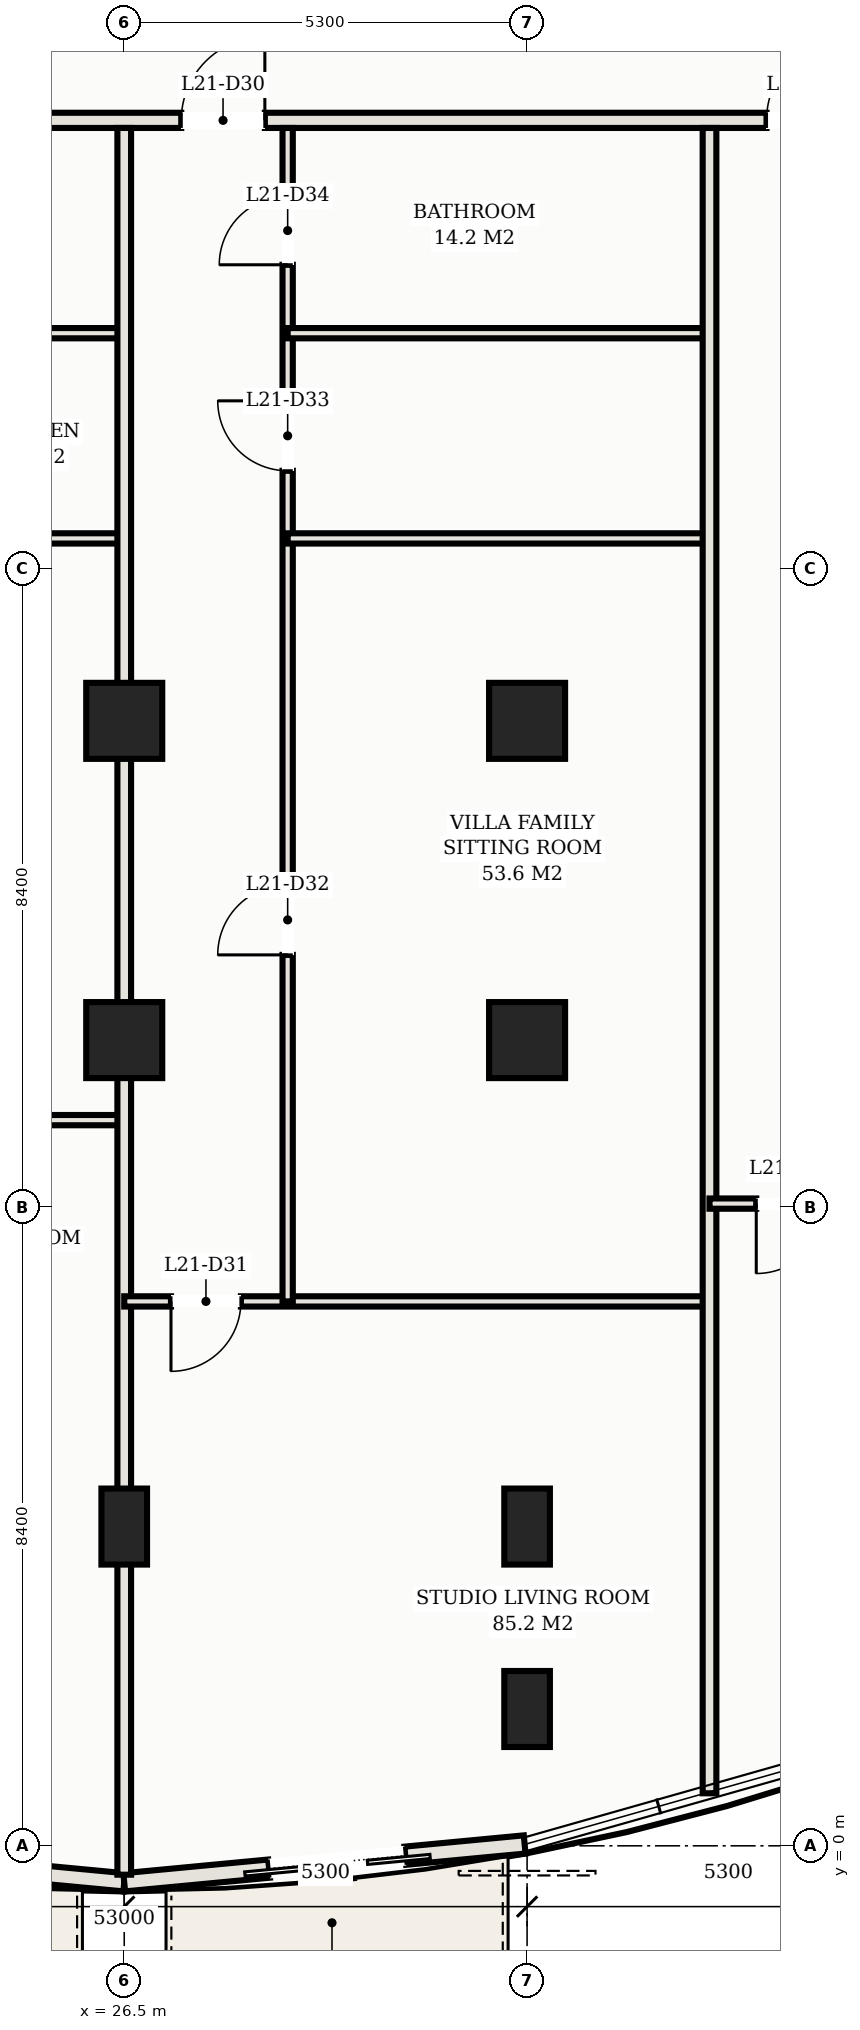
"""IFC4 building model, lengths in metres.
Left out: names, types, materials, properties, quantities, classifications, styles, units other than length and angle.
Written with IfcOpenShell. Run it as: python <this file> out.ifc"""

import sys

from ifc_helpers import new_model, si_unit, direction, frame, frame_2d, origin, origin_2d, place, context, subcontext, project, spatial, rectangle, hollow_rectangle, extrude, element, fill, save


model = new_model("IFC4")
c1 = context("Model", 3, precision=1e-05, world=origin(), true_north=direction((0.0, 1.0)))
c2 = subcontext(c1, "Body", "Model", "MODEL_VIEW")
j1 = project(units=[si_unit("LENGTHUNIT", "METRE"), si_unit("PLANEANGLEUNIT", "RADIAN")], contexts=[c1])
p1 = place(None, origin())
s1 = spatial("IfcSite", under=j1, at=p1, CompositionType="ELEMENT")
p2 = place(p1, origin())
s2 = spatial("IfcBuilding", under=s1, at=p2, CompositionType="ELEMENT")
p3 = place(p2, frame((0.0, 0.0, 81.7)))
s3 = spatial("IfcBuildingStorey", under=s2, at=p3, CompositionType="ELEMENT", Elevation=81.7)
for number, where, z_axis, x_axis in (
    (1, (26.5, 14.8, 0.0), (0.0, 0.0, 1.0), (1.0, 0.0, 0.0)),
    (2, (26.5, 10.6, 0.0), (0.0, 0.0, 1.0), (1.0, 0.0, 0.0)),
    (3, (31.8, 14.8, 0.0), (0.0, 0.0, 1.0), (1.0, 0.0, 0.0)),
    (4, (31.8, 10.6, 0.0), (0.0, 0.0, 1.0), (1.0, 0.0, 0.0)),
):
    element("IfcColumn", number, at=place(p3, frame(where, z_axis=z_axis, x_axis=x_axis)), inside=s3, PredefinedType="COLUMN", context=c2, shape_type="SweptSolid", body=[
        extrude(hollow_rectangle(XDim=1.0, YDim=1.0, WallThickness=0.036, at=origin_2d()), origin(), (0.0, 0.0, 1.0), 3.3),
    ])
for number, where, z_axis, x_axis in (
    (5, (31.8, 1.8, 0.0), (0.0, 0.0, 1.0), (1.0, 0.0, 0.0)),
    (6, (26.5, 4.2, 0.0), (0.0, 0.0, 1.0), (1.0, 0.0, 0.0)),
    (7, (31.8, 4.2, 0.0), (0.0, 0.0, 1.0), (1.0, 0.0, 0.0)),
):
    element("IfcColumn", number, at=place(p3, frame(where, z_axis=z_axis, x_axis=x_axis)), inside=s3, PredefinedType="COLUMN", context=c2, shape_type="SweptSolid", body=[
        extrude(hollow_rectangle(XDim=0.6, YDim=1.0, WallThickness=0.032, at=origin_2d()), origin(), (0.0, 0.0, 1.0), 3.3),
    ])
p4 = place(p3, frame((21.232, 0.018, 0.0), z_axis=(0.0, 0.0, 1.0), x_axis=(0.995560760834, -0.094121046997, 0.0)))
e8 = element("IfcWall", 8, at=p4, inside=s3, PredefinedType="SOLIDWALL", context=c2, shape_type="SweptSolid", body=[
    extrude(rectangle(XDim=5.292, YDim=0.24, at=frame_2d((2.646, 0.0))), origin(), (0.0, 0.0, 1.0), 3.09),
])
p5 = place(p4, frame((1.577, 0.0, 0.0)))
e9 = element("IfcOpeningElement", 9, at=p5, cuts=e8, PredefinedType="OPENING", context=c2, shape_type="SweptSolid", body=[
    extrude(rectangle(XDim=1.8, YDim=2.2, at=frame_2d((0.9, 1.1))), frame((0.0, 0.13, 0.0), z_axis=(0.0, -1.0, 0.0), x_axis=(1.0, 0.0, 0.0)), (0.0, 0.0, 1.0), 0.26),
])
p6 = place(p3, frame((26.5, -0.48, 0.0), z_axis=(0.0, 0.0, 1.0), x_axis=(0.995560760834, 0.094121046997, 0.0)))
e10 = element("IfcWall", 10, at=p6, inside=s3, PredefinedType="SOLIDWALL", context=c2, shape_type="SweptSolid", body=[
    extrude(rectangle(XDim=5.292, YDim=0.24, at=frame_2d((2.646, 0.0))), origin(), (0.0, 0.0, 1.0), 3.09),
])
p7 = place(p6, frame((1.914, 0.0, 0.0)))
e11 = element("IfcOpeningElement", 11, at=p7, cuts=e10, PredefinedType="OPENING", context=c2, shape_type="SweptSolid", body=[
    extrude(rectangle(XDim=1.8, YDim=2.2, at=frame_2d((0.9, 1.1))), frame((0.0, 0.13, 0.0), z_axis=(0.0, -1.0, 0.0), x_axis=(1.0, 0.0, 0.0)), (0.0, 0.0, 1.0), 0.26),
])
p8 = place(p3, frame((1.62, 22.7, 0.0), z_axis=(0.0, 0.0, 1.0), x_axis=(1.0, 0.0, 0.0)))
e12 = element("IfcWall", 12, at=p8, inside=s3, PredefinedType="PARTITIONING", context=c2, shape_type="SweptSolid", body=[
    extrude(rectangle(XDim=49.76, YDim=0.2, at=frame_2d((24.88, 0.0))), origin(), (0.0, 0.0, 1.0), 2.38),
])
p9 = place(p8, frame((9.73, 0.0, 0.0)))
e13 = element("IfcOpeningElement", 13, at=p9, cuts=e12, PredefinedType="OPENING", context=c2, shape_type="SweptSolid", body=[
    extrude(rectangle(XDim=1.1, YDim=2.25, at=frame_2d((0.55, 1.125))), frame((0.0, 0.11, 0.0), z_axis=(0.0, -1.0, 0.0), x_axis=(1.0, 0.0, 0.0)), (0.0, 0.0, 1.0), 0.22),
])
p10 = place(p8, frame((15.03, 0.0, 0.0)))
e14 = element("IfcOpeningElement", 14, at=p10, cuts=e12, PredefinedType="OPENING", context=c2, shape_type="SweptSolid", body=[
    extrude(rectangle(XDim=1.1, YDim=2.25, at=frame_2d((0.55, 1.125))), frame((0.0, 0.11, 0.0), z_axis=(0.0, -1.0, 0.0), x_axis=(1.0, 0.0, 0.0)), (0.0, 0.0, 1.0), 0.22),
])
p11 = place(p8, frame((20.33, 0.0, 0.0)))
e15 = element("IfcOpeningElement", 15, at=p11, cuts=e12, PredefinedType="OPENING", context=c2, shape_type="SweptSolid", body=[
    extrude(rectangle(XDim=1.1, YDim=2.25, at=frame_2d((0.55, 1.125))), frame((0.0, 0.11, 0.0), z_axis=(0.0, -1.0, 0.0), x_axis=(1.0, 0.0, 0.0)), (0.0, 0.0, 1.0), 0.22),
])
p12 = place(p8, frame((25.63, 0.0, 0.0)))
e16 = element("IfcOpeningElement", 16, at=p12, cuts=e12, PredefinedType="OPENING", context=c2, shape_type="SweptSolid", body=[
    extrude(rectangle(XDim=1.1, YDim=2.25, at=frame_2d((0.55, 1.125))), frame((0.0, 0.11, 0.0), z_axis=(0.0, -1.0, 0.0), x_axis=(1.0, 0.0, 0.0)), (0.0, 0.0, 1.0), 0.22),
])
p13 = place(p8, frame((33.33, 0.0, 0.0)))
e17 = element("IfcOpeningElement", 17, at=p13, cuts=e12, PredefinedType="OPENING", context=c2, shape_type="SweptSolid", body=[
    extrude(rectangle(XDim=1.1, YDim=2.25, at=frame_2d((0.55, 1.125))), frame((0.0, 0.11, 0.0), z_axis=(0.0, -1.0, 0.0), x_axis=(1.0, 0.0, 0.0)), (0.0, 0.0, 1.0), 0.22),
])
p14 = place(p8, frame((3.985, 0.0, 0.0)))
e18 = element("IfcOpeningElement", 18, at=p14, cuts=e12, PredefinedType="OPENING", context=c2, shape_type="SweptSolid", body=[
    extrude(rectangle(XDim=0.92, YDim=2.15, at=frame_2d((0.46, 1.075))), frame((0.0, 0.11, 0.0), z_axis=(0.0, -1.0, 0.0), x_axis=(1.0, 0.0, 0.0)), (0.0, 0.0, 1.0), 0.22),
])
p15 = place(p8, frame((44.855, 0.0, 0.0)))
e19 = element("IfcOpeningElement", 19, at=p15, cuts=e12, PredefinedType="OPENING", context=c2, shape_type="SweptSolid", body=[
    extrude(rectangle(XDim=0.92, YDim=2.15, at=frame_2d((0.46, 1.075))), frame((0.0, 0.11, 0.0), z_axis=(0.0, -1.0, 0.0), x_axis=(1.0, 0.0, 0.0)), (0.0, 0.0, 1.0), 0.22),
])
p16 = place(p3, frame((21.2, 9.547, 0.0), z_axis=(0.0, 0.0, 1.0), x_axis=(1.0, 0.0, 0.0)))
e20 = element("IfcWall", 20, at=p16, inside=s3, PredefinedType="PARTITIONING", context=c2, shape_type="SweptSolid", body=[
    extrude(rectangle(XDim=5.3, YDim=0.135, at=frame_2d((2.65, 0.0))), origin(), (0.0, 0.0, 1.0), 2.38),
])
p17 = place(p16, frame((0.815, 0.0, 0.0)))
e21 = element("IfcOpeningElement", 21, at=p17, cuts=e20, PredefinedType="OPENING", context=c2, shape_type="SweptSolid", body=[
    extrude(rectangle(XDim=0.92, YDim=2.15, at=frame_2d((0.46, 1.075))), frame((0.0, 0.078, 0.0), z_axis=(0.0, -1.0, 0.0), x_axis=(1.0, 0.0, 0.0)), (0.0, 0.0, 1.0), 0.155),
])
for number, where, z_axis, x_axis in (
    (22, (23.35, 17.2, 0.0), (0.0, 0.0, 1.0), (1.0, 0.0, 0.0)),
    (23, (23.35, 19.9, 0.0), (0.0, 0.0, 1.0), (1.0, 0.0, 0.0)),
):
    element("IfcWall", number, at=place(p3, frame(where, z_axis=z_axis, x_axis=x_axis)), inside=s3, PredefinedType="PARTITIONING", context=c2, shape_type="SweptSolid", body=[
        extrude(rectangle(XDim=3.15, YDim=0.135, at=frame_2d((1.575, 0.0))), origin(), (0.0, 0.0, 1.0), 2.38),
    ])
p18 = place(p3, frame((26.5, -0.38, 0.0), z_axis=(0.0, 0.0, 1.0), x_axis=(0.0, 1.0, 0.0)))
e24 = element("IfcWall", 24, at=p18, inside=s3, PredefinedType="PARTITIONING", context=c2, shape_type="SweptSolid", body=[
    extrude(rectangle(XDim=22.98, YDim=0.18, at=frame_2d((11.49, 0.0))), origin(), (0.0, 0.0, 1.0), 2.335),
])
p19 = place(p3, frame((26.5, 7.162, 0.0), z_axis=(0.0, 0.0, 1.0), x_axis=(1.0, 0.0, 0.0)))
e25 = element("IfcWall", 25, at=p19, inside=s3, PredefinedType="PARTITIONING", context=c2, shape_type="SweptSolid", body=[
    extrude(rectangle(XDim=7.7, YDim=0.135, at=frame_2d((3.85, 0.0))), origin(), (0.0, 0.0, 1.0), 2.38),
])
p20 = place(p19, frame((0.615, 0.0, 0.0)))
e26 = element("IfcOpeningElement", 26, at=p20, cuts=e25, PredefinedType="OPENING", context=c2, shape_type="SweptSolid", body=[
    extrude(rectangle(XDim=0.92, YDim=2.15, at=frame_2d((0.46, 1.075))), frame((0.0, 0.078, 0.0), z_axis=(0.0, -1.0, 0.0), x_axis=(1.0, 0.0, 0.0)), (0.0, 0.0, 1.0), 0.155),
])
p21 = place(p3, frame((28.65, 7.162, 0.0), z_axis=(0.0, 0.0, 1.0), x_axis=(0.0, 1.0, 0.0)))
e27 = element("IfcWall", 27, at=p21, inside=s3, PredefinedType="PARTITIONING", context=c2, shape_type="SweptSolid", body=[
    extrude(rectangle(XDim=15.438, YDim=0.135, at=frame_2d((7.719, 0.0))), origin(), (0.0, 0.0, 1.0), 2.38),
])
p22 = place(p21, frame((4.559, 0.0, 0.0)))
e28 = element("IfcOpeningElement", 28, at=p22, cuts=e27, PredefinedType="OPENING", context=c2, shape_type="SweptSolid", body=[
    extrude(rectangle(XDim=0.92, YDim=2.15, at=frame_2d((0.46, 1.075))), frame((0.0, 0.078, 0.0), z_axis=(0.0, -1.0, 0.0), x_axis=(1.0, 0.0, 0.0)), (0.0, 0.0, 1.0), 0.155),
])
p23 = place(p21, frame((10.928, 0.0, 0.0)))
e29 = element("IfcOpeningElement", 29, at=p23, cuts=e27, PredefinedType="OPENING", context=c2, shape_type="SweptSolid", body=[
    extrude(rectangle(XDim=0.92, YDim=2.15, at=frame_2d((0.46, 1.075))), frame((0.0, 0.078, 0.0), z_axis=(0.0, -1.0, 0.0), x_axis=(1.0, 0.0, 0.0)), (0.0, 0.0, 1.0), 0.155),
])
p24 = place(p21, frame((13.638, 0.0, 0.0)))
e30 = element("IfcOpeningElement", 30, at=p24, cuts=e27, PredefinedType="OPENING", context=c2, shape_type="SweptSolid", body=[
    extrude(rectangle(XDim=0.9, YDim=2.15, at=frame_2d((0.45, 1.075))), frame((0.0, 0.078, 0.0), z_axis=(0.0, -1.0, 0.0), x_axis=(1.0, 0.0, 0.0)), (0.0, 0.0, 1.0), 0.155),
])
for number, where, z_axis, x_axis in (
    (31, (28.65, 17.2, 0.0), (0.0, 0.0, 1.0), (1.0, 0.0, 0.0)),
    (32, (28.65, 19.9, 0.0), (0.0, 0.0, 1.0), (1.0, 0.0, 0.0)),
):
    element("IfcWall", number, at=place(p3, frame(where, z_axis=z_axis, x_axis=x_axis)), inside=s3, PredefinedType="PARTITIONING", context=c2, shape_type="SweptSolid", body=[
        extrude(rectangle(XDim=5.55, YDim=0.135, at=frame_2d((2.775, 0.0))), origin(), (0.0, 0.0, 1.0), 2.38),
    ])
p25 = place(p3, frame((34.2, 0.691, 0.0), z_axis=(0.0, 0.0, 1.0), x_axis=(0.0, 1.0, 0.0)))
e33 = element("IfcWall", 33, at=p25, inside=s3, PredefinedType="PARTITIONING", context=c2, shape_type="SweptSolid", body=[
    extrude(rectangle(XDim=21.909, YDim=0.18, at=frame_2d((10.955, 0.0))), origin(), (0.0, 0.0, 1.0), 2.38),
])
p26 = place(p3, frame((34.2, 8.449, 0.0), z_axis=(0.0, 0.0, 1.0), x_axis=(1.0, 0.0, 0.0)))
e34 = element("IfcWall", 34, at=p26, inside=s3, PredefinedType="PARTITIONING", context=c2, shape_type="SweptSolid", body=[
    extrude(rectangle(XDim=8.2, YDim=0.135, at=frame_2d((4.1, 0.0))), origin(), (0.0, 0.0, 1.0), 2.38),
])
p27 = place(p26, frame((0.615, 0.0, 0.0)))
e35 = element("IfcOpeningElement", 35, at=p27, cuts=e34, PredefinedType="OPENING", context=c2, shape_type="SweptSolid", body=[
    extrude(rectangle(XDim=0.92, YDim=2.15, at=frame_2d((0.46, 1.075))), frame((0.0, 0.078, 0.0), z_axis=(0.0, -1.0, 0.0), x_axis=(1.0, 0.0, 0.0)), (0.0, 0.0, 1.0), 0.155),
])
p28 = place(p7, frame((1.8, 0.0, 0.0), z_axis=(0.0, 0.0, 1.0), x_axis=(-1.0, 0.0, 0.0)))
e36 = element("IfcDoor", 36, at=p28, inside=s3, OperationType="DOUBLE_DOOR_SLIDING", PredefinedType="DOOR", context=c2, shape_type="SweptSolid", body=[
    extrude(rectangle(XDim=1.8, YDim=2.2, at=frame_2d((0.9, 1.1))), frame((0.0, 0.025, 0.0), z_axis=(0.0, -1.0, 0.0), x_axis=(1.0, 0.0, 0.0)), (0.0, 0.0, 1.0), 0.05),
])
fill(e11, e36)
p29 = place(p12, origin())
e37 = element("IfcDoor", 37, at=p29, inside=s3, OperationType="SINGLE_SWING_RIGHT", PredefinedType="DOOR", context=c2, shape_type="SweptSolid", body=[
    extrude(rectangle(XDim=1.1, YDim=2.25, at=frame_2d((0.55, 1.125))), frame((0.0, 0.025, 0.0), z_axis=(0.0, -1.0, 0.0), x_axis=(1.0, 0.0, 0.0)), (0.0, 0.0, 1.0), 0.05),
])
fill(e16, e37)
p30 = place(p20, frame((0.92, 0.0, 0.0), z_axis=(0.0, 0.0, 1.0), x_axis=(-1.0, 0.0, 0.0)))
e38 = element("IfcDoor", 38, at=p30, inside=s3, OperationType="SINGLE_SWING_RIGHT", PredefinedType="DOOR", context=c2, shape_type="SweptSolid", body=[
    extrude(rectangle(XDim=0.92, YDim=2.15, at=frame_2d((0.46, 1.075))), frame((0.0, 0.025, 0.0), z_axis=(0.0, -1.0, 0.0), x_axis=(1.0, 0.0, 0.0)), (0.0, 0.0, 1.0), 0.05),
])
fill(e26, e38)
p31 = place(p22, origin())
e39 = element("IfcDoor", 39, at=p31, inside=s3, OperationType="SINGLE_SWING_LEFT", PredefinedType="DOOR", context=c2, shape_type="SweptSolid", body=[
    extrude(rectangle(XDim=0.92, YDim=2.15, at=frame_2d((0.46, 1.075))), frame((0.0, 0.025, 0.0), z_axis=(0.0, -1.0, 0.0), x_axis=(1.0, 0.0, 0.0)), (0.0, 0.0, 1.0), 0.05),
])
fill(e28, e39)
p32 = place(p23, origin())
e40 = element("IfcDoor", 40, at=p32, inside=s3, OperationType="SINGLE_SWING_RIGHT", PredefinedType="DOOR", context=c2, shape_type="SweptSolid", body=[
    extrude(rectangle(XDim=0.92, YDim=2.15, at=frame_2d((0.46, 1.075))), frame((0.0, 0.025, 0.0), z_axis=(0.0, -1.0, 0.0), x_axis=(1.0, 0.0, 0.0)), (0.0, 0.0, 1.0), 0.05),
])
fill(e29, e40)
p33 = place(p24, origin())
e41 = element("IfcDoor", 41, at=p33, inside=s3, OperationType="SINGLE_SWING_LEFT", PredefinedType="DOOR", context=c2, shape_type="SweptSolid", body=[
    extrude(rectangle(XDim=0.9, YDim=2.15, at=frame_2d((0.45, 1.075))), frame((0.0, 0.025, 0.0), z_axis=(0.0, -1.0, 0.0), x_axis=(1.0, 0.0, 0.0)), (0.0, 0.0, 1.0), 0.05),
])
fill(e30, e41)
p34 = place(p13, origin())
e42 = element("IfcDoor", 42, at=p34, inside=s3, OperationType="SINGLE_SWING_RIGHT", PredefinedType="DOOR", context=c2, shape_type="SweptSolid", body=[
    extrude(rectangle(XDim=1.1, YDim=2.25, at=frame_2d((0.55, 1.125))), frame((0.0, 0.025, 0.0), z_axis=(0.0, -1.0, 0.0), x_axis=(1.0, 0.0, 0.0)), (0.0, 0.0, 1.0), 0.05),
])
fill(e17, e42)
p35 = place(p27, frame((0.92, 0.0, 0.0), z_axis=(0.0, 0.0, 1.0), x_axis=(-1.0, 0.0, 0.0)))
e43 = element("IfcDoor", 43, at=p35, inside=s3, OperationType="SINGLE_SWING_RIGHT", PredefinedType="DOOR", context=c2, shape_type="SweptSolid", body=[
    extrude(rectangle(XDim=0.92, YDim=2.15, at=frame_2d((0.46, 1.075))), frame((0.0, 0.025, 0.0), z_axis=(0.0, -1.0, 0.0), x_axis=(1.0, 0.0, 0.0)), (0.0, 0.0, 1.0), 0.05),
])
fill(e35, e43)
save(model, sys.argv[1])
